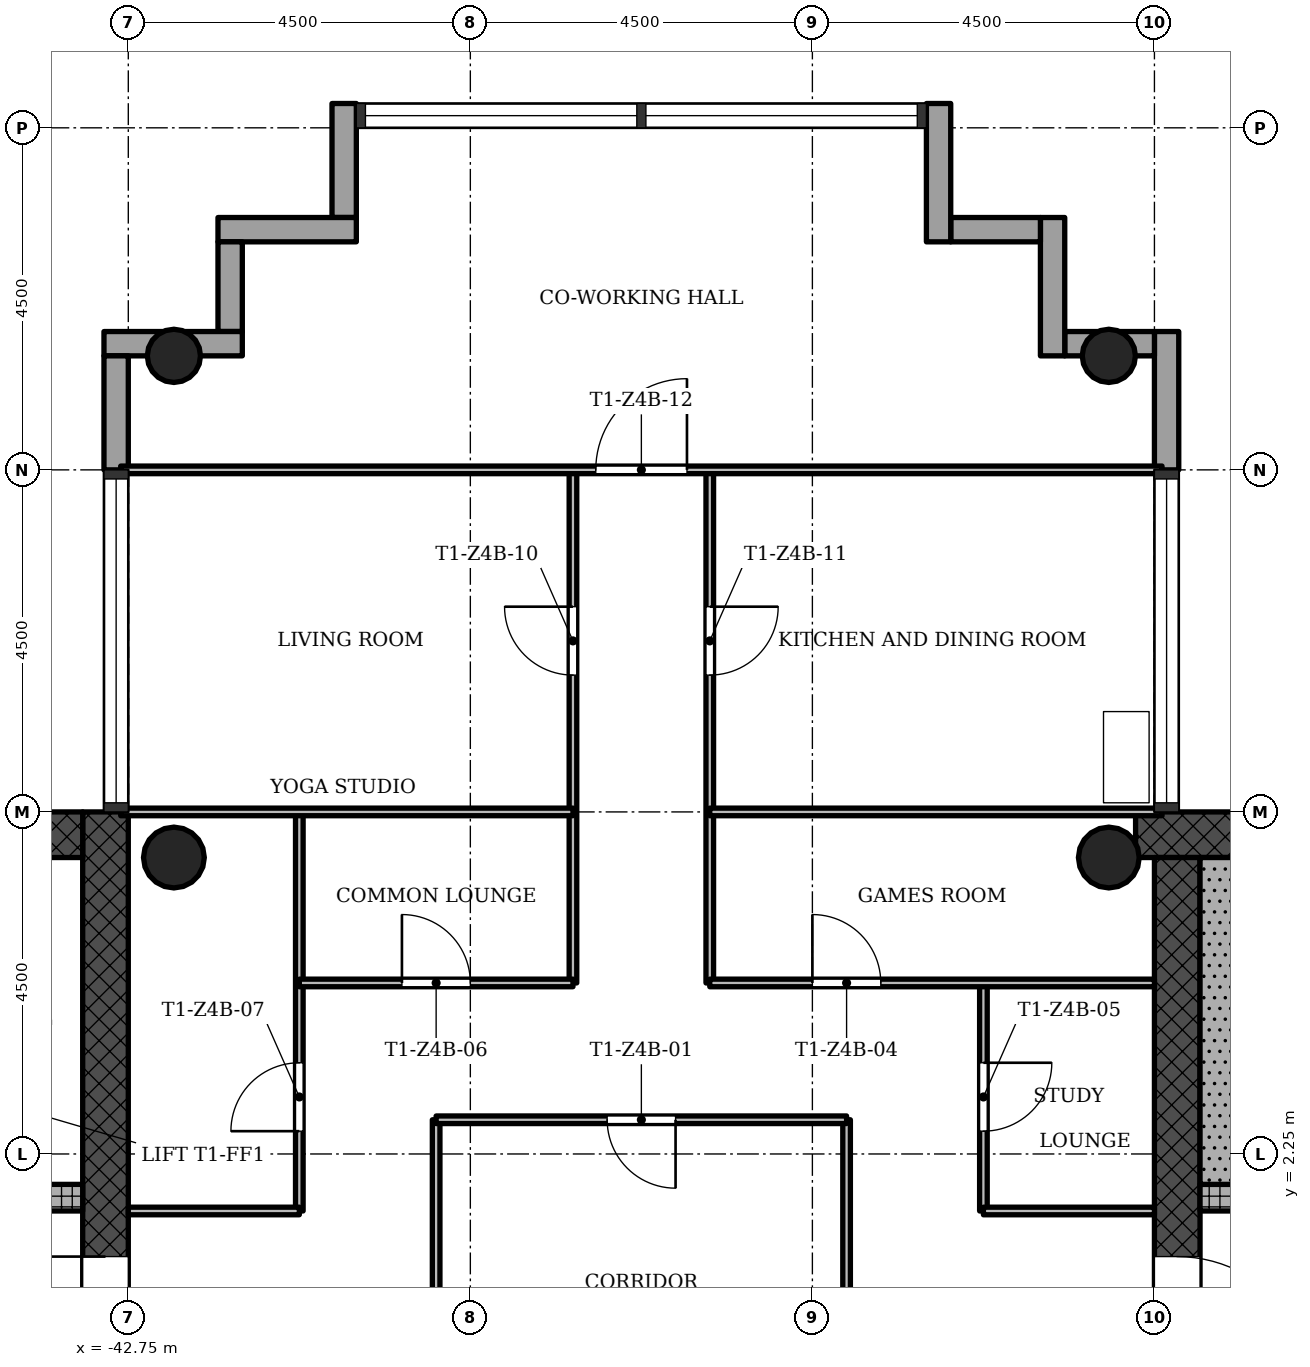
"""IFC4 building model, lengths in metres.
Left out: names, types, materials, properties, quantities, classifications, styles, units other than length and angle.
Written with IfcOpenShell. Run it as: python <this file> out.ifc"""

import sys

from ifc_helpers import new_model, si_unit, direction, frame, frame_2d, origin, origin_2d, place, context, subcontext, project, spatial, rectangle, hollow_circle, extrude, element, fill, save


model = new_model("IFC4")
c1 = context("Model", 3, precision=1e-05, world=origin(), true_north=direction((0.0, 1.0)))
c2 = subcontext(c1, "Body", "Model", "MODEL_VIEW")
j1 = project(units=[si_unit("LENGTHUNIT", "METRE"), si_unit("PLANEANGLEUNIT", "RADIAN")], contexts=[c1])
p1 = place(None, origin())
s1 = spatial("IfcSite", under=j1, at=p1, CompositionType="ELEMENT")
p2 = place(p1, origin())
s2 = spatial("IfcBuilding", under=s1, at=p2, CompositionType="ELEMENT")
p3 = place(p2, frame((0.0, 0.0, 230.0)))
s3 = spatial("IfcBuildingStorey", under=s2, at=p3, CompositionType="ELEMENT", Elevation=230.0)
p4 = place(p3, frame((-20.602, 6.45, 0.0), z_axis=(0.0, 0.0, 1.0), x_axis=(-1.0, 0.0, 0.0)))
e1 = element("IfcWall", 1, at=p4, inside=s3, PredefinedType="SHEAR", context=c2, shape_type="SweptSolid", body=[
    extrude(rectangle(XDim=8.896, YDim=0.6, at=frame_2d((4.448, 0.0))), origin(), (0.0, 0.0, 1.0), 3.4),
])
p5 = place(p3, frame((-28.95, 6.15, 0.0), z_axis=(0.0, 0.0, 1.0), x_axis=(0.0, -1.0, 0.0)))
e2 = element("IfcWall", 2, at=p5, inside=s3, PredefinedType="SHEAR", context=c2, shape_type="SweptSolid", body=[
    extrude(rectangle(XDim=12.9, YDim=0.6, at=frame_2d((6.45, 0.0))), origin(), (0.0, 0.0, 1.0), 3.4),
])
p6 = place(p5, frame((5.25, 0.0, 0.0)))
e3 = element("IfcOpeningElement", 3, at=p6, cuts=e2, PredefinedType="OPENING", context=c2, shape_type="SweptSolid", body=[
    extrude(rectangle(XDim=1.8, YDim=2.1, at=frame_2d((0.9, 1.05))), frame((0.0, 0.31, 0.0), z_axis=(0.0, -1.0, 0.0), x_axis=(1.0, 0.0, 0.0)), (0.0, 0.0, 1.0), 0.62),
])
p7 = place(p3, frame((-28.65, 1.675, 0.0), z_axis=(0.0, 0.0, 1.0), x_axis=(1.0, 0.0, 0.0)))
e4 = element("IfcWall", 4, at=p7, inside=s3, PredefinedType="SHEAR", context=c2, shape_type="SweptSolid", body=[
    extrude(rectangle(XDim=7.8, YDim=0.35, at=frame_2d((3.9, 0.0))), origin(), (0.0, 0.0, 1.0), 3.4),
])
p8 = place(p7, frame((1.05, 0.0, 0.0)))
e5 = element("IfcOpeningElement", 5, at=p8, cuts=e4, PredefinedType="OPENING", context=c2, shape_type="SweptSolid", body=[
    extrude(rectangle(XDim=0.9, YDim=2.1, at=frame_2d((0.45, 1.05))), frame((0.0, 0.185, 0.0), z_axis=(0.0, -1.0, 0.0), x_axis=(1.0, 0.0, 0.0)), (0.0, 0.0, 1.0), 0.37),
])
p9 = place(p3, frame((-43.05, -6.15, 0.0), z_axis=(0.0, 0.0, 1.0), x_axis=(0.0, 1.0, 0.0)))
e6 = element("IfcWall", 6, at=p9, inside=s3, PredefinedType="SHEAR", context=c2, shape_type="SweptSolid", body=[
    extrude(rectangle(XDim=12.9, YDim=0.6, at=frame_2d((6.45, 0.0))), origin(), (0.0, 0.0, 1.0), 3.4),
])
p10 = place(p9, frame((5.25, 0.0, 0.0)))
e7 = element("IfcOpeningElement", 7, at=p10, cuts=e6, PredefinedType="OPENING", context=c2, shape_type="SweptSolid", body=[
    extrude(rectangle(XDim=1.8, YDim=2.1, at=frame_2d((0.9, 1.05))), frame((0.0, 0.31, 0.0), z_axis=(0.0, -1.0, 0.0), x_axis=(1.0, 0.0, 0.0)), (0.0, 0.0, 1.0), 0.62),
])
p11 = place(p3, frame((-43.35, 6.45, 0.0), z_axis=(0.0, 0.0, 1.0), x_axis=(-1.0, 0.0, 0.0)))
e8 = element("IfcWall", 8, at=p11, inside=s3, PredefinedType="SHEAR", context=c2, shape_type="SweptSolid", body=[
    extrude(rectangle(XDim=8.4, YDim=0.6, at=frame_2d((4.2, 0.0))), origin(), (0.0, 0.0, 1.0), 3.4),
])
p12 = place(p3, frame((-51.15, 1.675, 0.0), z_axis=(0.0, 0.0, 1.0), x_axis=(1.0, 0.0, 0.0)))
e9 = element("IfcWall", 9, at=p12, inside=s3, PredefinedType="SHEAR", context=c2, shape_type="SweptSolid", body=[
    extrude(rectangle(XDim=7.8, YDim=0.35, at=frame_2d((3.9, 0.0))), origin(), (0.0, 0.0, 1.0), 3.4),
])
p13 = place(p12, frame((5.55, 0.0, 0.0)))
e10 = element("IfcOpeningElement", 10, at=p13, cuts=e9, PredefinedType="OPENING", context=c2, shape_type="SweptSolid", body=[
    extrude(rectangle(XDim=1.1, YDim=2.1, at=frame_2d((0.55, 1.05))), frame((0.0, 0.185, 0.0), z_axis=(0.0, -1.0, 0.0), x_axis=(1.0, 0.0, 0.0)), (0.0, 0.0, 1.0), 0.37),
])
p14 = place(p12, frame((1.2, 0.0, 0.0)))
e11 = element("IfcOpeningElement", 11, at=p14, cuts=e9, PredefinedType="OPENING", context=c2, shape_type="SweptSolid", body=[
    extrude(rectangle(XDim=1.1, YDim=2.1, at=frame_2d((0.55, 1.05))), frame((0.0, 0.185, 0.0), z_axis=(0.0, -1.0, 0.0), x_axis=(1.0, 0.0, 0.0)), (0.0, 0.0, 1.0), 0.37),
])
p15 = place(p12, frame((3.5, 0.0, 0.0)))
e12 = element("IfcOpeningElement", 12, at=p15, cuts=e9, PredefinedType="OPENING", context=c2, shape_type="SweptSolid", body=[
    extrude(rectangle(XDim=0.9, YDim=2.1, at=frame_2d((0.45, 1.05))), frame((0.0, 0.185, 0.0), z_axis=(0.0, -1.0, 0.0), x_axis=(1.0, 0.0, 0.0)), (0.0, 0.0, 1.0), 0.37),
])
for number, where, z_axis, x_axis in (
    (13, (-29.85, 12.75, 0.0), (0.0, 0.0, 1.0), (1.0, 0.0, 0.0)),
    (14, (-42.15, 12.75, 0.0), (0.0, 0.0, 1.0), (1.0, 0.0, 0.0)),
):
    element("IfcColumn", number, at=place(p3, frame(where, z_axis=z_axis, x_axis=x_axis)), inside=s3, PredefinedType="COLUMN", context=c2, shape_type="SweptSolid", body=[
        extrude(hollow_circle(Radius=0.35, WallThickness=0.025, at=origin_2d()), origin(), (0.0, 0.0, 1.0), 3.4),
    ])
for number, where, z_axis, x_axis in (
    (15, (-29.85, 6.15, 0.0), (0.0, 0.0, 1.0), (1.0, 0.0, 0.0)),
    (16, (-42.15, 6.15, 0.0), (0.0, 0.0, 1.0), (1.0, 0.0, 0.0)),
):
    element("IfcColumn", number, at=place(p3, frame(where, z_axis=z_axis, x_axis=x_axis)), inside=s3, PredefinedType="COLUMN", context=c2, shape_type="SweptSolid", body=[
        extrude(hollow_circle(Radius=0.4, WallThickness=0.028, at=origin_2d()), origin(), (0.0, 0.0, 1.0), 3.4),
    ])
p16 = place(p3, frame((-29.09, 11.25, -0.3), z_axis=(0.0, 0.0, 1.0), x_axis=(0.0, 1.0, 0.0)))
e17 = element("IfcWall", 17, at=p16, inside=s3, PredefinedType="STANDARD", context=c2, shape_type="SweptSolid", body=[
    extrude(rectangle(XDim=1.82, YDim=0.32, at=frame_2d((0.91, 0.0))), origin(), (0.0, 0.0, 1.0), 3.4),
])
p17 = place(p3, frame((-29.25, 12.91, -0.3), z_axis=(0.0, 0.0, 1.0), x_axis=(-1.0, 0.0, 0.0)))
e18 = element("IfcWall", 18, at=p17, inside=s3, PredefinedType="STANDARD", context=c2, shape_type="SweptSolid", body=[
    extrude(rectangle(XDim=1.18, YDim=0.32, at=frame_2d((0.59, 0.0))), origin(), (0.0, 0.0, 1.0), 3.4),
])
p18 = place(p3, frame((-30.59, 12.75, -0.3), z_axis=(0.0, 0.0, 1.0), x_axis=(0.0, 1.0, 0.0)))
e19 = element("IfcWall", 19, at=p18, inside=s3, PredefinedType="STANDARD", context=c2, shape_type="SweptSolid", body=[
    extrude(rectangle(XDim=1.82, YDim=0.32, at=frame_2d((0.91, 0.0))), origin(), (0.0, 0.0, 1.0), 3.4),
])
p19 = place(p3, frame((-30.75, 14.41, -0.3), z_axis=(0.0, 0.0, 1.0), x_axis=(-1.0, 0.0, 0.0)))
e20 = element("IfcWall", 20, at=p19, inside=s3, PredefinedType="STANDARD", context=c2, shape_type="SweptSolid", body=[
    extrude(rectangle(XDim=1.18, YDim=0.32, at=frame_2d((0.59, 0.0))), origin(), (0.0, 0.0, 1.0), 3.4),
])
p20 = place(p3, frame((-32.09, 14.25, -0.3), z_axis=(0.0, 0.0, 1.0), x_axis=(0.0, 1.0, 0.0)))
e21 = element("IfcWall", 21, at=p20, inside=s3, PredefinedType="STANDARD", context=c2, shape_type="SweptSolid", body=[
    extrude(rectangle(XDim=1.82, YDim=0.32, at=frame_2d((0.91, 0.0))), origin(), (0.0, 0.0, 1.0), 3.4),
])
p21 = place(p3, frame((-39.91, 16.07, -0.3), z_axis=(0.0, 0.0, 1.0), x_axis=(0.0, -1.0, 0.0)))
e22 = element("IfcWall", 22, at=p21, inside=s3, PredefinedType="STANDARD", context=c2, shape_type="SweptSolid", body=[
    extrude(rectangle(XDim=1.5, YDim=0.32, at=frame_2d((0.75, 0.0))), origin(), (0.0, 0.0, 1.0), 3.4),
])
p22 = place(p3, frame((-39.75, 14.41, -0.3), z_axis=(0.0, 0.0, 1.0), x_axis=(-1.0, 0.0, 0.0)))
e23 = element("IfcWall", 23, at=p22, inside=s3, PredefinedType="STANDARD", context=c2, shape_type="SweptSolid", body=[
    extrude(rectangle(XDim=1.82, YDim=0.32, at=frame_2d((0.91, 0.0))), origin(), (0.0, 0.0, 1.0), 3.4),
])
p23 = place(p3, frame((-41.41, 14.25, -0.3), z_axis=(0.0, 0.0, 1.0), x_axis=(0.0, -1.0, 0.0)))
e24 = element("IfcWall", 24, at=p23, inside=s3, PredefinedType="STANDARD", context=c2, shape_type="SweptSolid", body=[
    extrude(rectangle(XDim=1.18, YDim=0.32, at=frame_2d((0.59, 0.0))), origin(), (0.0, 0.0, 1.0), 3.4),
])
p24 = place(p3, frame((-41.25, 12.91, -0.3), z_axis=(0.0, 0.0, 1.0), x_axis=(-1.0, 0.0, 0.0)))
e25 = element("IfcWall", 25, at=p24, inside=s3, PredefinedType="STANDARD", context=c2, shape_type="SweptSolid", body=[
    extrude(rectangle(XDim=1.82, YDim=0.32, at=frame_2d((0.91, 0.0))), origin(), (0.0, 0.0, 1.0), 3.4),
])
p25 = place(p3, frame((-42.91, 12.75, -0.3), z_axis=(0.0, 0.0, 1.0), x_axis=(0.0, -1.0, 0.0)))
e26 = element("IfcWall", 26, at=p25, inside=s3, PredefinedType="STANDARD", context=c2, shape_type="SweptSolid", body=[
    extrude(rectangle(XDim=1.5, YDim=0.32, at=frame_2d((0.75, 0.0))), origin(), (0.0, 0.0, 1.0), 3.4),
])
p26 = place(p3, frame((-40.5, 1.5, 0.0), z_axis=(0.0, 0.0, 1.0), x_axis=(0.0, 1.0, 0.0)))
e27 = element("IfcWall", 27, at=p26, inside=s3, PredefinedType="PARTITIONING", context=c2, shape_type="SweptSolid", body=[
    extrude(rectangle(XDim=5.25, YDim=0.1, at=frame_2d((2.625, 0.0))), origin(), (0.0, 0.0, 1.0), 2.98),
])
p27 = place(p26, frame((1.05, 0.0, 0.0)))
e28 = element("IfcOpeningElement", 28, at=p27, cuts=e27, PredefinedType="OPENING", context=c2, shape_type="SweptSolid", body=[
    extrude(rectangle(XDim=0.9, YDim=2.1, at=frame_2d((0.45, 1.05))), frame((0.0, 0.06, 0.0), z_axis=(0.0, -1.0, 0.0), x_axis=(1.0, 0.0, 0.0)), (0.0, 0.0, 1.0), 0.12),
])
p28 = place(p3, frame((-38.7, -2.7, 0.0), z_axis=(0.0, 0.0, 1.0), x_axis=(0.0, 1.0, 0.0)))
e29 = element("IfcWall", 29, at=p28, inside=s3, PredefinedType="PARTITIONING", context=c2, shape_type="SweptSolid", body=[
    extrude(rectangle(XDim=5.4, YDim=0.1, at=frame_2d((2.7, 0.0))), origin(), (0.0, 0.0, 1.0), 2.98),
])
p29 = place(p3, frame((-36.9, 4.5, 0.0), z_axis=(0.0, 0.0, 1.0), x_axis=(0.0, 1.0, 0.0)))
e30 = element("IfcWall", 30, at=p29, inside=s3, PredefinedType="PARTITIONING", context=c2, shape_type="SweptSolid", body=[
    extrude(rectangle(XDim=6.75, YDim=0.1, at=frame_2d((3.375, 0.0))), origin(), (0.0, 0.0, 1.0), 2.98),
])
p30 = place(p29, frame((4.05, 0.0, 0.0)))
e31 = element("IfcOpeningElement", 31, at=p30, cuts=e30, PredefinedType="OPENING", context=c2, shape_type="SweptSolid", body=[
    extrude(rectangle(XDim=0.9, YDim=2.1, at=frame_2d((0.45, 1.05))), frame((0.0, 0.06, 0.0), z_axis=(0.0, -1.0, 0.0), x_axis=(1.0, 0.0, 0.0)), (0.0, 0.0, 1.0), 0.12),
])
p31 = place(p3, frame((-35.1, 4.5, 0.0), z_axis=(0.0, 0.0, 1.0), x_axis=(0.0, 1.0, 0.0)))
e32 = element("IfcWall", 32, at=p31, inside=s3, PredefinedType="PARTITIONING", context=c2, shape_type="SweptSolid", body=[
    extrude(rectangle(XDim=6.75, YDim=0.1, at=frame_2d((3.375, 0.0))), origin(), (0.0, 0.0, 1.0), 2.98),
])
p32 = place(p31, frame((4.05, 0.0, 0.0)))
e33 = element("IfcOpeningElement", 33, at=p32, cuts=e32, PredefinedType="OPENING", context=c2, shape_type="SweptSolid", body=[
    extrude(rectangle(XDim=0.9, YDim=2.1, at=frame_2d((0.45, 1.05))), frame((0.0, 0.06, 0.0), z_axis=(0.0, -1.0, 0.0), x_axis=(1.0, 0.0, 0.0)), (0.0, 0.0, 1.0), 0.12),
])
p33 = place(p3, frame((-33.3, -2.7, 0.0), z_axis=(0.0, 0.0, 1.0), x_axis=(0.0, 1.0, 0.0)))
e34 = element("IfcWall", 34, at=p33, inside=s3, PredefinedType="PARTITIONING", context=c2, shape_type="SweptSolid", body=[
    extrude(rectangle(XDim=5.4, YDim=0.1, at=frame_2d((2.7, 0.0))), origin(), (0.0, 0.0, 1.0), 2.98),
])
p34 = place(p33, frame((2.25, 0.0, 0.0)))
e35 = element("IfcOpeningElement", 35, at=p34, cuts=e34, PredefinedType="OPENING", context=c2, shape_type="SweptSolid", body=[
    extrude(rectangle(XDim=0.9, YDim=2.1, at=frame_2d((0.45, 1.05))), frame((0.0, 0.06, 0.0), z_axis=(0.0, -1.0, 0.0), x_axis=(1.0, 0.0, 0.0)), (0.0, 0.0, 1.0), 0.12),
])
p35 = place(p3, frame((-31.5, 1.5, 0.0), z_axis=(0.0, 0.0, 1.0), x_axis=(0.0, 1.0, 0.0)))
e36 = element("IfcWall", 36, at=p35, inside=s3, PredefinedType="PARTITIONING", context=c2, shape_type="SweptSolid", body=[
    extrude(rectangle(XDim=3.0, YDim=0.1, at=frame_2d((1.5, 0.0))), origin(), (0.0, 0.0, 1.0), 2.98),
])
p36 = place(p35, frame((1.05, 0.0, 0.0)))
e37 = element("IfcOpeningElement", 37, at=p36, cuts=e36, PredefinedType="OPENING", context=c2, shape_type="SweptSolid", body=[
    extrude(rectangle(XDim=0.9, YDim=2.1, at=frame_2d((0.45, 1.05))), frame((0.0, 0.06, 0.0), z_axis=(0.0, -1.0, 0.0), x_axis=(1.0, 0.0, 0.0)), (0.0, 0.0, 1.0), 0.12),
])
for number, where, z_axis, x_axis in (
    (38, (-42.75, 1.5, 0.0), (0.0, 0.0, 1.0), (1.0, 0.0, 0.0)),
    (39, (-31.5, 1.5, 0.0), (0.0, 0.0, 1.0), (1.0, 0.0, 0.0)),
):
    element("IfcWall", number, at=place(p3, frame(where, z_axis=z_axis, x_axis=x_axis)), inside=s3, PredefinedType="PARTITIONING", context=c2, shape_type="SweptSolid", body=[
        extrude(rectangle(XDim=2.25, YDim=0.1, at=frame_2d((1.125, 0.0))), origin(), (0.0, 0.0, 1.0), 2.98),
    ])
p37 = place(p3, frame((-38.7, 2.7, 0.0), z_axis=(0.0, 0.0, 1.0), x_axis=(1.0, 0.0, 0.0)))
e40 = element("IfcWall", 40, at=p37, inside=s3, PredefinedType="PARTITIONING", context=c2, shape_type="SweptSolid", body=[
    extrude(rectangle(XDim=5.4, YDim=0.1, at=frame_2d((2.7, 0.0))), origin(), (0.0, 0.0, 1.0), 2.98),
])
p38 = place(p37, frame((2.25, 0.0, 0.0)))
e41 = element("IfcOpeningElement", 41, at=p38, cuts=e40, PredefinedType="OPENING", context=c2, shape_type="SweptSolid", body=[
    extrude(rectangle(XDim=0.9, YDim=2.1, at=frame_2d((0.45, 1.05))), frame((0.0, 0.06, 0.0), z_axis=(0.0, -1.0, 0.0), x_axis=(1.0, 0.0, 0.0)), (0.0, 0.0, 1.0), 0.12),
])
p39 = place(p3, frame((-40.5, 4.5, 0.0), z_axis=(0.0, 0.0, 1.0), x_axis=(1.0, 0.0, 0.0)))
e42 = element("IfcWall", 42, at=p39, inside=s3, PredefinedType="PARTITIONING", context=c2, shape_type="SweptSolid", body=[
    extrude(rectangle(XDim=3.6, YDim=0.1, at=frame_2d((1.8, 0.0))), origin(), (0.0, 0.0, 1.0), 2.98),
])
p40 = place(p39, frame((1.35, 0.0, 0.0)))
e43 = element("IfcOpeningElement", 43, at=p40, cuts=e42, PredefinedType="OPENING", context=c2, shape_type="SweptSolid", body=[
    extrude(rectangle(XDim=0.9, YDim=2.1, at=frame_2d((0.45, 1.05))), frame((0.0, 0.06, 0.0), z_axis=(0.0, -1.0, 0.0), x_axis=(1.0, 0.0, 0.0)), (0.0, 0.0, 1.0), 0.12),
])
p41 = place(p3, frame((-35.1, 4.5, 0.0), z_axis=(0.0, 0.0, 1.0), x_axis=(1.0, 0.0, 0.0)))
e44 = element("IfcWall", 44, at=p41, inside=s3, PredefinedType="PARTITIONING", context=c2, shape_type="SweptSolid", body=[
    extrude(rectangle(XDim=5.85, YDim=0.1, at=frame_2d((2.925, 0.0))), origin(), (0.0, 0.0, 1.0), 2.98),
])
p42 = place(p41, frame((1.35, 0.0, 0.0)))
e45 = element("IfcOpeningElement", 45, at=p42, cuts=e44, PredefinedType="OPENING", context=c2, shape_type="SweptSolid", body=[
    extrude(rectangle(XDim=0.9, YDim=2.1, at=frame_2d((0.45, 1.05))), frame((0.0, 0.06, 0.0), z_axis=(0.0, -1.0, 0.0), x_axis=(1.0, 0.0, 0.0)), (0.0, 0.0, 1.0), 0.12),
])
for number, where, z_axis, x_axis in (
    (46, (-42.85, 6.75, 0.0), (0.0, 0.0, 1.0), (1.0, 0.0, 0.0)),
    (47, (-35.1, 6.75, 0.0), (0.0, 0.0, 1.0), (1.0, 0.0, 0.0)),
):
    element("IfcWall", number, at=place(p3, frame(where, z_axis=z_axis, x_axis=x_axis)), inside=s3, PredefinedType="PARTITIONING", context=c2, shape_type="SweptSolid", body=[
        extrude(rectangle(XDim=5.95, YDim=0.1, at=frame_2d((2.975, 0.0))), origin(), (0.0, 0.0, 1.0), 2.98),
    ])
p43 = place(p3, frame((-42.85, 11.25, 0.0), z_axis=(0.0, 0.0, 1.0), x_axis=(1.0, 0.0, 0.0)))
e48 = element("IfcWall", 48, at=p43, inside=s3, PredefinedType="PARTITIONING", context=c2, shape_type="SweptSolid", body=[
    extrude(rectangle(XDim=13.7, YDim=0.1, at=frame_2d((6.85, 0.0))), origin(), (0.0, 0.0, 1.0), 2.98),
])
p44 = place(p43, frame((6.25, 0.0, 0.0)))
e49 = element("IfcOpeningElement", 49, at=p44, cuts=e48, PredefinedType="OPENING", context=c2, shape_type="SweptSolid", body=[
    extrude(rectangle(XDim=1.2, YDim=2.1, at=frame_2d((0.6, 1.05))), frame((0.0, 0.06, 0.0), z_axis=(0.0, -1.0, 0.0), x_axis=(1.0, 0.0, 0.0)), (0.0, 0.0, 1.0), 0.12),
])
p45 = place(p3, frame((-28.35, 1.85, 0.0), z_axis=(0.0, 0.0, 1.0), x_axis=(0.0, 1.0, 0.0)))
e50 = element("IfcWall", 50, at=p45, inside=s3, PredefinedType="SHEAR", context=c2, shape_type="SweptSolid", body=[
    extrude(rectangle(XDim=4.3, YDim=0.6, at=frame_2d((2.15, 0.0))), origin(), (0.0, 0.0, 1.0), 3.4),
])
p46 = place(p38, origin())
e51 = element("IfcDoor", 51, at=p46, inside=s3, OperationType="SINGLE_SWING_RIGHT", PredefinedType="DOOR", context=c2, shape_type="SweptSolid", body=[
    extrude(rectangle(XDim=0.9, YDim=2.1, at=frame_2d((0.45, 1.05))), frame((0.0, 0.025, 0.0), z_axis=(0.0, -1.0, 0.0), x_axis=(1.0, 0.0, 0.0)), (0.0, 0.0, 1.0), 0.05),
])
fill(e41, e51)
p47 = place(p42, origin())
e52 = element("IfcDoor", 52, at=p47, inside=s3, OperationType="SINGLE_SWING_RIGHT", PredefinedType="DOOR", context=c2, shape_type="SweptSolid", body=[
    extrude(rectangle(XDim=0.9, YDim=2.1, at=frame_2d((0.45, 1.05))), frame((0.0, 0.025, 0.0), z_axis=(0.0, -1.0, 0.0), x_axis=(1.0, 0.0, 0.0)), (0.0, 0.0, 1.0), 0.05),
])
fill(e45, e52)
p48 = place(p36, origin())
e53 = element("IfcDoor", 53, at=p48, inside=s3, OperationType="SINGLE_SWING_RIGHT", PredefinedType="DOOR", context=c2, shape_type="SweptSolid", body=[
    extrude(rectangle(XDim=0.9, YDim=2.1, at=frame_2d((0.45, 1.05))), frame((0.0, 0.025, 0.0), z_axis=(0.0, -1.0, 0.0), x_axis=(1.0, 0.0, 0.0)), (0.0, 0.0, 1.0), 0.05),
])
fill(e37, e53)
p49 = place(p40, origin())
e54 = element("IfcDoor", 54, at=p49, inside=s3, OperationType="SINGLE_SWING_RIGHT", PredefinedType="DOOR", context=c2, shape_type="SweptSolid", body=[
    extrude(rectangle(XDim=0.9, YDim=2.1, at=frame_2d((0.45, 1.05))), frame((0.0, 0.025, 0.0), z_axis=(0.0, -1.0, 0.0), x_axis=(1.0, 0.0, 0.0)), (0.0, 0.0, 1.0), 0.05),
])
fill(e43, e54)
p50 = place(p27, origin())
e55 = element("IfcDoor", 55, at=p50, inside=s3, OperationType="SINGLE_SWING_RIGHT", PredefinedType="DOOR", context=c2, shape_type="SweptSolid", body=[
    extrude(rectangle(XDim=0.9, YDim=2.1, at=frame_2d((0.45, 1.05))), frame((0.0, 0.025, 0.0), z_axis=(0.0, -1.0, 0.0), x_axis=(1.0, 0.0, 0.0)), (0.0, 0.0, 1.0), 0.05),
])
fill(e28, e55)
p51 = place(p30, origin())
e56 = element("IfcDoor", 56, at=p51, inside=s3, OperationType="SINGLE_SWING_LEFT", PredefinedType="DOOR", context=c2, shape_type="SweptSolid", body=[
    extrude(rectangle(XDim=0.9, YDim=2.1, at=frame_2d((0.45, 1.05))), frame((0.0, 0.025, 0.0), z_axis=(0.0, -1.0, 0.0), x_axis=(1.0, 0.0, 0.0)), (0.0, 0.0, 1.0), 0.05),
])
fill(e31, e56)
p52 = place(p32, origin())
e57 = element("IfcDoor", 57, at=p52, inside=s3, OperationType="SINGLE_SWING_RIGHT", PredefinedType="DOOR", context=c2, shape_type="SweptSolid", body=[
    extrude(rectangle(XDim=0.9, YDim=2.1, at=frame_2d((0.45, 1.05))), frame((0.0, 0.025, 0.0), z_axis=(0.0, -1.0, 0.0), x_axis=(1.0, 0.0, 0.0)), (0.0, 0.0, 1.0), 0.05),
])
fill(e33, e57)
p53 = place(p44, origin())
e58 = element("IfcDoor", 58, at=p53, inside=s3, OperationType="SINGLE_SWING_LEFT", PredefinedType="DOOR", context=c2, shape_type="SweptSolid", body=[
    extrude(rectangle(XDim=1.2, YDim=2.1, at=frame_2d((0.6, 1.05))), frame((0.0, 0.025, 0.0), z_axis=(0.0, -1.0, 0.0), x_axis=(1.0, 0.0, 0.0)), (0.0, 0.0, 1.0), 0.05),
])
fill(e49, e58)
p54 = place(p6, origin())
e59 = element("IfcDoor", 59, at=p54, inside=s3, OperationType="SINGLE_SWING_LEFT", PredefinedType="DOOR", context=c2, shape_type="SweptSolid", body=[
    extrude(rectangle(XDim=1.8, YDim=2.1, at=frame_2d((0.9, 1.05))), frame((0.0, 0.025, 0.0), z_axis=(0.0, -1.0, 0.0), x_axis=(1.0, 0.0, 0.0)), (0.0, 0.0, 1.0), 0.05),
])
fill(e3, e59)
p55 = place(p10, origin())
e60 = element("IfcDoor", 60, at=p55, inside=s3, OperationType="SINGLE_SWING_LEFT", PredefinedType="DOOR", context=c2, shape_type="SweptSolid", body=[
    extrude(rectangle(XDim=1.8, YDim=2.1, at=frame_2d((0.9, 1.05))), frame((0.0, 0.025, 0.0), z_axis=(0.0, -1.0, 0.0), x_axis=(1.0, 0.0, 0.0)), (0.0, 0.0, 1.0), 0.05),
])
fill(e7, e60)
save(model, sys.argv[1])
